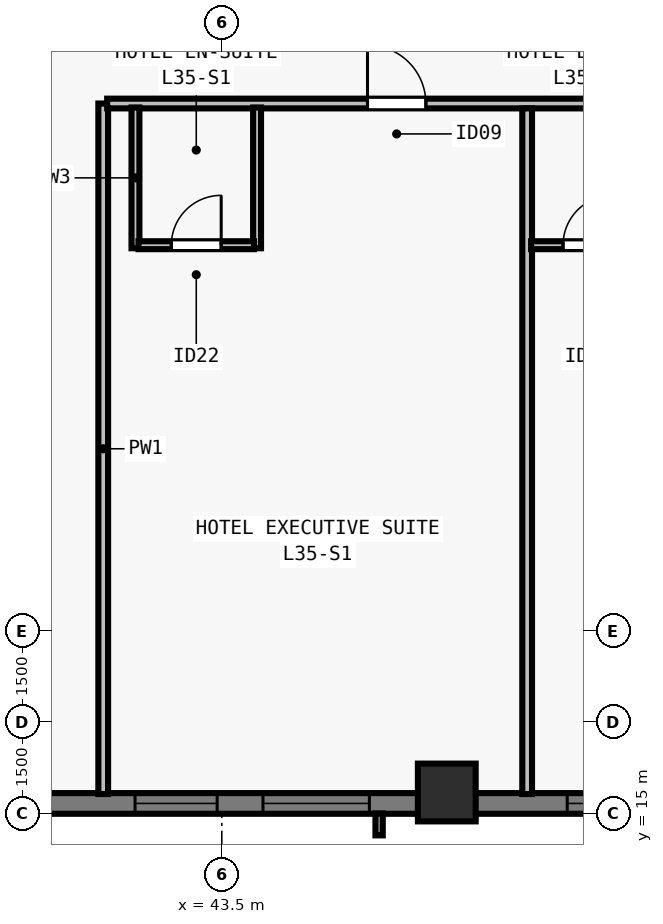
"""IFC4 building model, lengths in metres.
Left out: names, types, materials, properties, quantities, classifications, styles, units other than length and angle.
Written with IfcOpenShell. Run it as: python <this file> out.ifc"""

import sys

from ifc_helpers import new_model, si_unit, direction, frame, frame_2d, origin, origin_2d, place, context, subcontext, project, spatial, rectangle, extrude, element, fill, save


model = new_model("IFC4")
c1 = context("Model", 3, precision=1e-05, world=origin(), true_north=direction((0.0, 1.0)))
c2 = subcontext(c1, "Body", "Model", "MODEL_VIEW")
j1 = project(units=[si_unit("LENGTHUNIT", "METRE"), si_unit("PLANEANGLEUNIT", "RADIAN")], contexts=[c1])
p1 = place(None, origin())
s1 = spatial("IfcSite", under=j1, at=p1, CompositionType="ELEMENT")
p2 = place(p1, origin())
s2 = spatial("IfcBuilding", under=s1, at=p2, CompositionType="ELEMENT")
p3 = place(p2, frame((0.0, 0.0, 130.5)))
s3 = spatial("IfcBuildingStorey", under=s2, at=p3, CompositionType="ELEMENT", Elevation=130.5)
p4 = place(p3, frame((47.2, 15.35, 0.0), z_axis=(0.0, 0.0, 1.0), x_axis=(1.0, 0.0, 0.0)))
e1 = element("IfcColumn", 1, at=p4, inside=s3, PredefinedType="COLUMN", context=c2, shape_type="SweptSolid", body=[
    extrude(rectangle(XDim=0.95, YDim=0.95, at=origin_2d()), origin(), (0.0, 0.0, 1.0), 3.5),
])
p5 = place(p3, frame((72.0, 15.17, 0.0), z_axis=(0.0, 0.0, 1.0), x_axis=(-1.0, 0.0, 0.0)))
e2 = element("IfcWall", 2, at=p5, inside=s3, PredefinedType="SOLIDWALL", context=c2, shape_type="SweptSolid", body=[
    extrude(rectangle(XDim=39.682, YDim=0.34, at=frame_2d((19.841, 0.0))), origin(), (0.0, 0.0, 1.0), 3.28),
])
p6 = place(p5, frame((8.955, 0.0, 0.8)))
e3 = element("IfcOpeningElement", 3, at=p6, cuts=e2, PredefinedType="OPENING", context=c2, shape_type="SweptSolid", body=[
    extrude(rectangle(XDim=1.35, YDim=1.66, at=frame_2d((0.675, 0.83))), frame((0.0, 0.18, 0.0), z_axis=(0.0, -1.0, 0.0), x_axis=(1.0, 0.0, 0.0)), (0.0, 0.0, 1.0), 0.36),
])
p7 = place(p5, frame((11.859, 0.0, 0.8)))
e4 = element("IfcOpeningElement", 4, at=p7, cuts=e2, PredefinedType="OPENING", context=c2, shape_type="SweptSolid", body=[
    extrude(rectangle(XDim=1.75, YDim=1.66, at=frame_2d((0.875, 0.83))), frame((0.0, 0.18, 0.0), z_axis=(0.0, -1.0, 0.0), x_axis=(1.0, 0.0, 0.0)), (0.0, 0.0, 1.0), 0.36),
])
p8 = place(p5, frame((16.062, 0.0, 0.8)))
e5 = element("IfcOpeningElement", 5, at=p8, cuts=e2, PredefinedType="OPENING", context=c2, shape_type="SweptSolid", body=[
    extrude(rectangle(XDim=1.35, YDim=1.66, at=frame_2d((0.675, 0.83))), frame((0.0, 0.18, 0.0), z_axis=(0.0, -1.0, 0.0), x_axis=(1.0, 0.0, 0.0)), (0.0, 0.0, 1.0), 0.36),
])
p9 = place(p5, frame((18.966, 0.0, 0.8)))
e6 = element("IfcOpeningElement", 6, at=p9, cuts=e2, PredefinedType="OPENING", context=c2, shape_type="SweptSolid", body=[
    extrude(rectangle(XDim=1.75, YDim=1.66, at=frame_2d((0.875, 0.83))), frame((0.0, 0.18, 0.0), z_axis=(0.0, -1.0, 0.0), x_axis=(1.0, 0.0, 0.0)), (0.0, 0.0, 1.0), 0.36),
])
p10 = place(p5, frame((21.469, 0.0, 0.8)))
e7 = element("IfcOpeningElement", 7, at=p10, cuts=e2, PredefinedType="OPENING", context=c2, shape_type="SweptSolid", body=[
    extrude(rectangle(XDim=1.35, YDim=1.66, at=frame_2d((0.675, 0.83))), frame((0.0, 0.18, 0.0), z_axis=(0.0, -1.0, 0.0), x_axis=(1.0, 0.0, 0.0)), (0.0, 0.0, 1.0), 0.36),
])
p11 = place(p5, frame((26.073, 0.0, 0.8)))
e8 = element("IfcOpeningElement", 8, at=p11, cuts=e2, PredefinedType="OPENING", context=c2, shape_type="SweptSolid", body=[
    extrude(rectangle(XDim=1.75, YDim=1.66, at=frame_2d((0.875, 0.83))), frame((0.0, 0.18, 0.0), z_axis=(0.0, -1.0, 0.0), x_axis=(1.0, 0.0, 0.0)), (0.0, 0.0, 1.0), 0.36),
])
p12 = place(p5, frame((28.577, 0.0, 0.8)))
e9 = element("IfcOpeningElement", 9, at=p12, cuts=e2, PredefinedType="OPENING", context=c2, shape_type="SweptSolid", body=[
    extrude(rectangle(XDim=1.35, YDim=1.66, at=frame_2d((0.675, 0.83))), frame((0.0, 0.18, 0.0), z_axis=(0.0, -1.0, 0.0), x_axis=(1.0, 0.0, 0.0)), (0.0, 0.0, 1.0), 0.36),
])
p13 = place(p3, frame((41.55, 15.325, 0.0), z_axis=(0.0, 0.0, 1.0), x_axis=(0.0, 1.0, 0.0)))
e10 = element("IfcWall", 10, at=p13, inside=s3, PredefinedType="PARTITIONING", context=c2, shape_type="SweptSolid", body=[
    extrude(rectangle(XDim=11.355, YDim=0.16, at=frame_2d((5.677, 0.0))), origin(), (0.0, 0.0, 1.0), 3.28),
])
p14 = place(p3, frame((41.615, 26.68, 0.0), z_axis=(0.0, 0.0, 1.0), x_axis=(1.0, 0.0, 0.0)))
e11 = element("IfcWall", 11, at=p14, inside=s3, PredefinedType="PARTITIONING", context=c2, shape_type="SweptSolid", body=[
    extrude(rectangle(XDim=22.07, YDim=0.16, at=frame_2d((11.035, 0.0))), origin(), (0.0, 0.0, 1.0), 3.28),
])
p15 = place(p14, frame((4.281, 0.0, 0.0)))
e12 = element("IfcOpeningElement", 12, at=p15, cuts=e11, PredefinedType="OPENING", context=c2, shape_type="SweptSolid", body=[
    extrude(rectangle(XDim=0.96, YDim=2.15, at=frame_2d((0.48, 1.075))), frame((0.0, 0.09, 0.0), z_axis=(0.0, -1.0, 0.0), x_axis=(1.0, 0.0, 0.0)), (0.0, 0.0, 1.0), 0.18),
])
p16 = place(p14, frame((11.56, 0.0, 0.0)))
e13 = element("IfcOpeningElement", 13, at=p16, cuts=e11, PredefinedType="OPENING", context=c2, shape_type="SweptSolid", body=[
    extrude(rectangle(XDim=0.96, YDim=2.15, at=frame_2d((0.48, 1.075))), frame((0.0, 0.09, 0.0), z_axis=(0.0, -1.0, 0.0), x_axis=(1.0, 0.0, 0.0)), (0.0, 0.0, 1.0), 0.18),
])
p17 = place(p14, frame((19.134, 0.0, 0.0)))
e14 = element("IfcOpeningElement", 14, at=p17, cuts=e11, PredefinedType="OPENING", context=c2, shape_type="SweptSolid", body=[
    extrude(rectangle(XDim=0.96, YDim=2.15, at=frame_2d((0.48, 1.075))), frame((0.0, 0.09, 0.0), z_axis=(0.0, -1.0, 0.0), x_axis=(1.0, 0.0, 0.0)), (0.0, 0.0, 1.0), 0.18),
])
for number, where, z_axis, x_axis in (
    (15, (42.08, 24.3, 0.0), (0.0, 0.0, 1.0), (0.0, 1.0, 0.0)),
    (16, (44.08, 24.3, 0.0), (0.0, 0.0, 1.0), (0.0, 1.0, 0.0)),
):
    element("IfcWall", number, at=place(p3, frame(where, z_axis=z_axis, x_axis=x_axis)), inside=s3, PredefinedType="PLUMBINGWALL", context=c2, shape_type="SweptSolid", body=[
        extrude(rectangle(XDim=2.315, YDim=0.13, at=frame_2d((1.157, 0.0))), origin(), (0.0, 0.0, 1.0), 3.28),
    ])
p18 = place(p3, frame((42.13, 24.35, 0.0), z_axis=(0.0, 0.0, 1.0), x_axis=(1.0, 0.0, 0.0)))
e17 = element("IfcWall", 17, at=p18, inside=s3, PredefinedType="PLUMBINGWALL", context=c2, shape_type="SweptSolid", body=[
    extrude(rectangle(XDim=1.9, YDim=0.13, at=frame_2d((0.95, 0.0))), origin(), (0.0, 0.0, 1.0), 3.28),
])
p19 = place(p18, frame((0.54, 0.0, 0.0)))
e18 = element("IfcOpeningElement", 18, at=p19, cuts=e17, PredefinedType="OPENING", context=c2, shape_type="SweptSolid", body=[
    extrude(rectangle(XDim=0.82, YDim=2.1, at=frame_2d((0.41, 1.05))), frame((0.0, 0.075, 0.0), z_axis=(0.0, -1.0, 0.0), x_axis=(1.0, 0.0, 0.0)), (0.0, 0.0, 1.0), 0.15),
])
p20 = place(p3, frame((48.522, 15.325, 0.0), z_axis=(0.0, 0.0, 1.0), x_axis=(0.0, 1.0, 0.0)))
e19 = element("IfcWall", 19, at=p20, inside=s3, PredefinedType="PARTITIONING", context=c2, shape_type="SweptSolid", body=[
    extrude(rectangle(XDim=11.275, YDim=0.16, at=frame_2d((5.638, 0.0))), origin(), (0.0, 0.0, 1.0), 2.896),
])
p21 = place(p3, frame((48.587, 24.35, 0.0), z_axis=(0.0, 0.0, 1.0), x_axis=(1.0, 0.0, 0.0)))
e20 = element("IfcWall", 20, at=p21, inside=s3, PredefinedType="PLUMBINGWALL", context=c2, shape_type="SweptSolid", body=[
    extrude(rectangle(XDim=1.885, YDim=0.13, at=frame_2d((0.942, 0.0))), origin(), (0.0, 0.0, 1.0), 3.28),
])
p22 = place(p21, frame((0.525, 0.0, 0.0)))
e21 = element("IfcOpeningElement", 21, at=p22, cuts=e20, PredefinedType="OPENING", context=c2, shape_type="SweptSolid", body=[
    extrude(rectangle(XDim=0.82, YDim=2.1, at=frame_2d((0.41, 1.05))), frame((0.0, 0.075, 0.0), z_axis=(0.0, -1.0, 0.0), x_axis=(1.0, 0.0, 0.0)), (0.0, 0.0, 1.0), 0.15),
])
p23 = place(p10, origin())
e22 = element("IfcWindow", 22, at=p23, inside=s3, PartitioningType="SINGLE_PANEL", PredefinedType="WINDOW", context=c2, shape_type="SweptSolid", body=[
    extrude(rectangle(XDim=1.35, YDim=1.66, at=frame_2d((0.675, 0.83))), frame((0.0, -0.05, 0.0), z_axis=(0.0, -1.0, 0.0), x_axis=(1.0, 0.0, 0.0)), (0.0, 0.0, 1.0), 0.06),
])
fill(e7, e22)
p24 = place(p11, origin())
e23 = element("IfcWindow", 23, at=p24, inside=s3, PartitioningType="SINGLE_PANEL", PredefinedType="WINDOW", context=c2, shape_type="SweptSolid", body=[
    extrude(rectangle(XDim=1.75, YDim=1.66, at=frame_2d((0.875, 0.83))), frame((0.0, -0.05, 0.0), z_axis=(0.0, -1.0, 0.0), x_axis=(1.0, 0.0, 0.0)), (0.0, 0.0, 1.0), 0.06),
])
fill(e8, e23)
p25 = place(p12, origin())
e24 = element("IfcWindow", 24, at=p25, inside=s3, PartitioningType="SINGLE_PANEL", PredefinedType="WINDOW", context=c2, shape_type="SweptSolid", body=[
    extrude(rectangle(XDim=1.35, YDim=1.66, at=frame_2d((0.675, 0.83))), frame((0.0, -0.05, 0.0), z_axis=(0.0, -1.0, 0.0), x_axis=(1.0, 0.0, 0.0)), (0.0, 0.0, 1.0), 0.06),
])
fill(e9, e24)
p26 = place(p19, origin())
e25 = element("IfcDoor", 25, at=p26, inside=s3, OperationType="SINGLE_SWING_RIGHT", PredefinedType="DOOR", context=c2, shape_type="SweptSolid", body=[
    extrude(rectangle(XDim=0.82, YDim=2.1, at=frame_2d((0.41, 1.05))), frame((0.0, 0.025, 0.0), z_axis=(0.0, -1.0, 0.0), x_axis=(1.0, 0.0, 0.0)), (0.0, 0.0, 1.0), 0.05),
])
fill(e18, e25)
p27 = place(p15, origin())
e26 = element("IfcDoor", 26, at=p27, inside=s3, OperationType="SINGLE_SWING_LEFT", PredefinedType="DOOR", context=c2, shape_type="SweptSolid", body=[
    extrude(rectangle(XDim=0.96, YDim=2.15, at=frame_2d((0.48, 1.075))), frame((0.0, 0.025, 0.0), z_axis=(0.0, -1.0, 0.0), x_axis=(1.0, 0.0, 0.0)), (0.0, 0.0, 1.0), 0.05),
])
fill(e12, e26)
p28 = place(p22, origin())
e27 = element("IfcDoor", 27, at=p28, inside=s3, OperationType="SINGLE_SWING_RIGHT", PredefinedType="DOOR", context=c2, shape_type="SweptSolid", body=[
    extrude(rectangle(XDim=0.82, YDim=2.1, at=frame_2d((0.41, 1.05))), frame((0.0, 0.025, 0.0), z_axis=(0.0, -1.0, 0.0), x_axis=(1.0, 0.0, 0.0)), (0.0, 0.0, 1.0), 0.05),
])
fill(e21, e27)
save(model, sys.argv[1])
